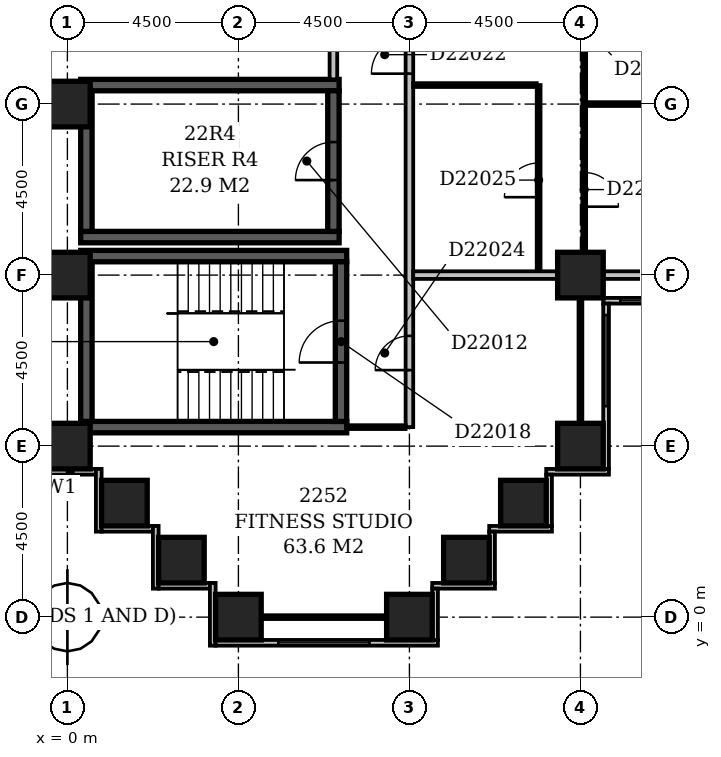
"""IFC4 building model, lengths in metres.
Left out: names, types, materials, properties, quantities, classifications, styles, units other than length and angle.
Written with IfcOpenShell. Run it as: python <this file> out.ifc"""

import sys

from ifc_helpers import new_model, si_unit, direction, frame, frame_2d, origin, origin_2d, place, context, subcontext, project, spatial, rectangle, extrude, element, fill, save


model = new_model("IFC4")
c1 = context("Model", 3, precision=1e-05, world=origin(), true_north=direction((0.0, 1.0)))
c2 = subcontext(c1, "Body", "Model", "MODEL_VIEW")
j1 = project(units=[si_unit("LENGTHUNIT", "METRE"), si_unit("PLANEANGLEUNIT", "RADIAN")], contexts=[c1])
p1 = place(None, origin())
s1 = spatial("IfcSite", under=j1, at=p1, CompositionType="ELEMENT")
p2 = place(p1, origin())
s2 = spatial("IfcBuilding", under=s1, at=p2, CompositionType="ELEMENT")
p3 = place(p2, frame((0.0, 0.0, 90.2)))
s3 = spatial("IfcBuildingStorey", under=s2, at=p3, CompositionType="ELEMENT", Elevation=90.2)
for number, where, z_axis, x_axis in (
    (1, (0.35, 5.0, -0.3), (0.0, 0.0, 1.0), (1.0, 0.0, 0.0)),
    (2, (0.35, 9.5, -0.3), (0.0, 0.0, 1.0), (1.0, 0.0, 0.0)),
):
    element("IfcWall", number, at=place(p3, frame(where, z_axis=z_axis, x_axis=x_axis)), inside=s3, PredefinedType="SHEAR", context=c2, shape_type="SweptSolid", body=[
        extrude(rectangle(XDim=7.0, YDim=0.3, at=frame_2d((3.5, 0.0))), origin(), (0.0, 0.0, 1.0), 3.6),
    ])
for number, where, z_axis, x_axis in (
    (3, (0.35, 10.0, -0.3), (0.0, 0.0, 1.0), (1.0, 0.0, 0.0)),
    (4, (0.35, 14.0, -0.3), (0.0, 0.0, 1.0), (1.0, 0.0, 0.0)),
):
    element("IfcWall", number, at=place(p3, frame(where, z_axis=z_axis, x_axis=x_axis)), inside=s3, PredefinedType="SHEAR", context=c2, shape_type="SweptSolid", body=[
        extrude(rectangle(XDim=6.8, YDim=0.3, at=frame_2d((3.4, 0.0))), origin(), (0.0, 0.0, 1.0), 3.6),
    ])
p4 = place(p3, frame((0.5, 5.15, -0.3), z_axis=(0.0, 0.0, 1.0), x_axis=(0.0, 1.0, 0.0)))
e5 = element("IfcWall", 5, at=p4, inside=s3, PredefinedType="SHEAR", context=c2, shape_type="SweptSolid", body=[
    extrude(rectangle(XDim=4.2, YDim=0.3, at=frame_2d((2.1, 0.0))), origin(), (0.0, 0.0, 1.0), 3.6),
])
p5 = place(p3, frame((0.5, 10.15, -0.3), z_axis=(0.0, 0.0, 1.0), x_axis=(0.0, 1.0, 0.0)))
e6 = element("IfcWall", 6, at=p5, inside=s3, PredefinedType="SHEAR", context=c2, shape_type="SweptSolid", body=[
    extrude(rectangle(XDim=3.7, YDim=0.3, at=frame_2d((1.85, 0.0))), origin(), (0.0, 0.0, 1.0), 3.6),
])
p6 = place(p3, frame((7.0, 10.15, -0.3), z_axis=(0.0, 0.0, 1.0), x_axis=(0.0, 1.0, 0.0)))
e7 = element("IfcWall", 7, at=p6, inside=s3, PredefinedType="SHEAR", context=c2, shape_type="SweptSolid", body=[
    extrude(rectangle(XDim=3.7, YDim=0.3, at=frame_2d((1.85, 0.0))), origin(), (0.0, 0.0, 1.0), 3.6),
])
p7 = place(p6, frame((1.35, 0.0, 0.3)))
e8 = element("IfcOpeningElement", 8, at=p7, cuts=e7, PredefinedType="OPENING", context=c2, shape_type="SweptSolid", body=[
    extrude(rectangle(XDim=1.0, YDim=2.1, at=frame_2d((0.5, 1.05))), frame((0.0, 0.162, 0.0), z_axis=(0.0, -1.0, 0.0), x_axis=(1.0, 0.0, 0.0)), (0.0, 0.0, 1.0), 0.324),
])
p8 = place(p3, frame((7.2, 5.15, -0.3), z_axis=(0.0, 0.0, 1.0), x_axis=(0.0, 1.0, 0.0)))
e9 = element("IfcWall", 9, at=p8, inside=s3, PredefinedType="SHEAR", context=c2, shape_type="SweptSolid", body=[
    extrude(rectangle(XDim=4.2, YDim=0.3, at=frame_2d((2.1, 0.0))), origin(), (0.0, 0.0, 1.0), 3.6),
])
p9 = place(p8, frame((1.55, 0.0, 0.3)))
e10 = element("IfcOpeningElement", 10, at=p9, cuts=e9, PredefinedType="OPENING", context=c2, shape_type="SweptSolid", body=[
    extrude(rectangle(XDim=1.1, YDim=2.1, at=frame_2d((0.55, 1.05))), frame((0.0, 0.162, 0.0), z_axis=(0.0, -1.0, 0.0), x_axis=(1.0, 0.0, 0.0)), (0.0, 0.0, 1.0), 0.324),
])
for number, where, z_axis, x_axis in (
    (11, (4.5, 0.0, -0.3), (0.0, 0.0, 1.0), (1.0, 0.0, 0.0)),
    (12, (9.0, 0.0, -0.3), (0.0, 0.0, 1.0), (1.0, 0.0, 0.0)),
    (13, (3.0, 1.5, -0.3), (0.0, 0.0, 1.0), (1.0, 0.0, 0.0)),
    (14, (10.5, 1.5, -0.3), (0.0, 0.0, 1.0), (1.0, 0.0, 0.0)),
    (15, (1.5, 3.0, -0.3), (0.0, 0.0, 1.0), (1.0, 0.0, 0.0)),
    (16, (12.0, 3.0, -0.3), (0.0, 0.0, 1.0), (1.0, 0.0, 0.0)),
    (17, (0.0, 4.5, -0.3), (0.0, 0.0, 1.0), (1.0, 0.0, 0.0)),
    (18, (13.5, 4.5, -0.3), (0.0, 0.0, 1.0), (1.0, 0.0, 0.0)),
    (19, (0.0, 9.0, -0.3), (0.0, 0.0, 1.0), (1.0, 0.0, 0.0)),
    (20, (13.5, 9.0, -0.3), (0.0, 0.0, 1.0), (1.0, 0.0, 0.0)),
    (21, (0.0, 13.5, -0.3), (0.0, 0.0, 1.0), (1.0, 0.0, 0.0)),
):
    element("IfcColumn", number, at=place(p3, frame(where, z_axis=z_axis, x_axis=x_axis)), inside=s3, PredefinedType="COLUMN", context=c2, shape_type="SweptSolid", body=[
        extrude(rectangle(XDim=1.2, YDim=1.2, at=origin_2d()), origin(), (0.0, 0.0, 1.0), 3.6),
    ])
p10 = place(p3, frame((9.675, -0.6, 0.0), z_axis=(0.0, 0.0, 1.0), x_axis=(0.0, 1.0, 0.0)))
e22 = element("IfcWall", 22, at=p10, inside=s3, PredefinedType="STANDARD", context=c2, shape_type="SweptSolid", body=[
    extrude(rectangle(XDim=1.35, YDim=0.15, at=frame_2d((0.675, 0.0))), origin(), (0.0, 0.0, 1.0), 2.7),
])
p11 = place(p3, frame((9.6, 0.825, 0.0), z_axis=(0.0, 0.0, 1.0), x_axis=(1.0, 0.0, 0.0)))
e23 = element("IfcWall", 23, at=p11, inside=s3, PredefinedType="STANDARD", context=c2, shape_type="SweptSolid", body=[
    extrude(rectangle(XDim=1.65, YDim=0.15, at=frame_2d((0.825, 0.0))), origin(), (0.0, 0.0, 1.0), 2.7),
])
p12 = place(p3, frame((11.175, 0.9, 0.0), z_axis=(0.0, 0.0, 1.0), x_axis=(0.0, 1.0, 0.0)))
e24 = element("IfcWall", 24, at=p12, inside=s3, PredefinedType="STANDARD", context=c2, shape_type="SweptSolid", body=[
    extrude(rectangle(XDim=1.35, YDim=0.15, at=frame_2d((0.675, 0.0))), origin(), (0.0, 0.0, 1.0), 2.7),
])
p13 = place(p3, frame((11.1, 2.325, 0.0), z_axis=(0.0, 0.0, 1.0), x_axis=(1.0, 0.0, 0.0)))
e25 = element("IfcWall", 25, at=p13, inside=s3, PredefinedType="STANDARD", context=c2, shape_type="SweptSolid", body=[
    extrude(rectangle(XDim=1.65, YDim=0.15, at=frame_2d((0.825, 0.0))), origin(), (0.0, 0.0, 1.0), 2.7),
])
p14 = place(p3, frame((12.675, 2.4, 0.0), z_axis=(0.0, 0.0, 1.0), x_axis=(0.0, 1.0, 0.0)))
e26 = element("IfcWall", 26, at=p14, inside=s3, PredefinedType="STANDARD", context=c2, shape_type="SweptSolid", body=[
    extrude(rectangle(XDim=1.35, YDim=0.15, at=frame_2d((0.675, 0.0))), origin(), (0.0, 0.0, 1.0), 2.7),
])
p15 = place(p3, frame((12.6, 3.825, 0.0), z_axis=(0.0, 0.0, 1.0), x_axis=(1.0, 0.0, 0.0)))
e27 = element("IfcWall", 27, at=p15, inside=s3, PredefinedType="STANDARD", context=c2, shape_type="SweptSolid", body=[
    extrude(rectangle(XDim=1.65, YDim=0.15, at=frame_2d((0.825, 0.0))), origin(), (0.0, 0.0, 1.0), 2.7),
])
p16 = place(p3, frame((14.175, 3.9, 0.0), z_axis=(0.0, 0.0, 1.0), x_axis=(0.0, 1.0, 0.0)))
e28 = element("IfcWall", 28, at=p16, inside=s3, PredefinedType="STANDARD", context=c2, shape_type="SweptSolid", body=[
    extrude(rectangle(XDim=4.35, YDim=0.15, at=frame_2d((2.175, 0.0))), origin(), (0.0, 0.0, 1.0), 2.7),
])
p17 = place(p16, frame((1.65, 0.0, 0.6)))
e29 = element("IfcOpeningElement", 29, at=p17, cuts=e28, PredefinedType="OPENING", context=c2, shape_type="SweptSolid", body=[
    extrude(rectangle(XDim=2.4, YDim=1.8, at=frame_2d((1.2, 0.9))), frame((0.0, 0.087, 0.0), z_axis=(0.0, -1.0, 0.0), x_axis=(1.0, 0.0, 0.0)), (0.0, 0.0, 1.0), 0.174),
])
p18 = place(p3, frame((14.1, 8.325, 0.0), z_axis=(0.0, 0.0, 1.0), x_axis=(1.0, 0.0, 0.0)))
e30 = element("IfcWall", 30, at=p18, inside=s3, PredefinedType="STANDARD", context=c2, shape_type="SweptSolid", body=[
    extrude(rectangle(XDim=4.65, YDim=0.15, at=frame_2d((2.325, 0.0))), origin(), (0.0, 0.0, 1.0), 2.7),
])
p19 = place(p18, frame((0.45, 0.0, 0.6)))
e31 = element("IfcOpeningElement", 31, at=p19, cuts=e30, PredefinedType="OPENING", context=c2, shape_type="SweptSolid", body=[
    extrude(rectangle(XDim=2.4, YDim=1.8, at=frame_2d((1.2, 0.9))), frame((0.0, 0.087, 0.0), z_axis=(0.0, -1.0, 0.0), x_axis=(1.0, 0.0, 0.0)), (0.0, 0.0, 1.0), 0.174),
])
p20 = place(p3, frame((-0.6, 3.825, 0.0), z_axis=(0.0, 0.0, 1.0), x_axis=(1.0, 0.0, 0.0)))
e32 = element("IfcWall", 32, at=p20, inside=s3, PredefinedType="STANDARD", context=c2, shape_type="SweptSolid", body=[
    extrude(rectangle(XDim=1.35, YDim=0.15, at=frame_2d((0.675, 0.0))), origin(), (0.0, 0.0, 1.0), 2.7),
])
p21 = place(p3, frame((0.825, 3.9, 0.0), z_axis=(0.0, 0.0, 1.0), x_axis=(0.0, -1.0, 0.0)))
e33 = element("IfcWall", 33, at=p21, inside=s3, PredefinedType="STANDARD", context=c2, shape_type="SweptSolid", body=[
    extrude(rectangle(XDim=1.65, YDim=0.15, at=frame_2d((0.825, 0.0))), origin(), (0.0, 0.0, 1.0), 2.7),
])
p22 = place(p3, frame((0.9, 2.325, 0.0), z_axis=(0.0, 0.0, 1.0), x_axis=(1.0, 0.0, 0.0)))
e34 = element("IfcWall", 34, at=p22, inside=s3, PredefinedType="STANDARD", context=c2, shape_type="SweptSolid", body=[
    extrude(rectangle(XDim=1.35, YDim=0.15, at=frame_2d((0.675, 0.0))), origin(), (0.0, 0.0, 1.0), 2.7),
])
p23 = place(p3, frame((2.325, 2.4, 0.0), z_axis=(0.0, 0.0, 1.0), x_axis=(0.0, -1.0, 0.0)))
e35 = element("IfcWall", 35, at=p23, inside=s3, PredefinedType="STANDARD", context=c2, shape_type="SweptSolid", body=[
    extrude(rectangle(XDim=1.65, YDim=0.15, at=frame_2d((0.825, 0.0))), origin(), (0.0, 0.0, 1.0), 2.7),
])
p24 = place(p3, frame((2.4, 0.825, 0.0), z_axis=(0.0, 0.0, 1.0), x_axis=(1.0, 0.0, 0.0)))
e36 = element("IfcWall", 36, at=p24, inside=s3, PredefinedType="STANDARD", context=c2, shape_type="SweptSolid", body=[
    extrude(rectangle(XDim=1.35, YDim=0.15, at=frame_2d((0.675, 0.0))), origin(), (0.0, 0.0, 1.0), 2.7),
])
p25 = place(p3, frame((3.825, 0.9, 0.0), z_axis=(0.0, 0.0, 1.0), x_axis=(0.0, -1.0, 0.0)))
e37 = element("IfcWall", 37, at=p25, inside=s3, PredefinedType="STANDARD", context=c2, shape_type="SweptSolid", body=[
    extrude(rectangle(XDim=1.65, YDim=0.15, at=frame_2d((0.825, 0.0))), origin(), (0.0, 0.0, 1.0), 2.7),
])
p26 = place(p3, frame((3.9, -0.675, 0.0), z_axis=(0.0, 0.0, 1.0), x_axis=(1.0, 0.0, 0.0)))
e38 = element("IfcWall", 38, at=p26, inside=s3, PredefinedType="STANDARD", context=c2, shape_type="SweptSolid", body=[
    extrude(rectangle(XDim=5.85, YDim=0.15, at=frame_2d((2.925, 0.0))), origin(), (0.0, 0.0, 1.0), 2.7),
])
p27 = place(p26, frame((1.65, 0.0, 0.6)))
e39 = element("IfcOpeningElement", 39, at=p27, cuts=e38, PredefinedType="OPENING", context=c2, shape_type="SweptSolid", body=[
    extrude(rectangle(XDim=2.4, YDim=1.8, at=frame_2d((1.2, 0.9))), frame((0.0, 0.087, 0.0), z_axis=(0.0, -1.0, 0.0), x_axis=(1.0, 0.0, 0.0)), (0.0, 0.0, 1.0), 0.174),
])
p28 = place(p3, frame((5.1, 0.0, 0.0), z_axis=(0.0, 0.0, 1.0), x_axis=(1.0, 0.0, 0.0)))
e40 = element("IfcWall", 40, at=p28, inside=s3, PredefinedType="PARTITIONING", context=c2, shape_type="SweptSolid", body=[
    extrude(rectangle(XDim=3.3, YDim=0.1, at=frame_2d((1.65, 0.0))), origin(), (0.0, 0.0, 1.0), 2.7),
])
p29 = place(p3, frame((0.0, 4.4, 0.0), z_axis=(0.0, 0.0, 1.0), x_axis=(0.0, 1.0, 0.0)))
e41 = element("IfcWall", 41, at=p29, inside=s3, PredefinedType="PARTITIONING", context=c2, shape_type="SweptSolid", body=[
    extrude(rectangle(XDim=0.7, YDim=0.1, at=frame_2d((0.35, 0.0))), origin(), (0.0, 0.0, 1.0), 2.7),
])
p30 = place(p3, frame((7.349, 5.0, 0.0), z_axis=(0.0, 0.0, 1.0), x_axis=(1.0, 0.0, 0.0)))
e42 = element("IfcWall", 42, at=p30, inside=s3, PredefinedType="PARTITIONING", context=c2, shape_type="SweptSolid", body=[
    extrude(rectangle(XDim=1.551, YDim=0.1, at=frame_2d((0.775, 0.0))), origin(), (0.0, 0.0, 1.0), 3.3),
])
p31 = place(p3, frame((9.0, 5.0, 0.0), z_axis=(0.0, 0.0, 1.0), x_axis=(0.0, 1.0, 0.0)))
e43 = element("IfcWall", 43, at=p31, inside=s3, PredefinedType="PARTITIONING", context=c2, shape_type="SweptSolid", body=[
    extrude(rectangle(XDim=44.5, YDim=0.2, at=frame_2d((22.25, 0.0))), origin(), (0.0, 0.0, 1.0), 3.3),
])
p32 = place(p31, frame((28.45, 0.0, 0.0)))
e44 = element("IfcOpeningElement", 44, at=p32, cuts=e43, PredefinedType="OPENING", context=c2, shape_type="SweptSolid", body=[
    extrude(rectangle(XDim=1.0, YDim=2.1, at=frame_2d((0.5, 1.05))), frame((0.0, 0.112, 0.0), z_axis=(0.0, -1.0, 0.0), x_axis=(1.0, 0.0, 0.0)), (0.0, 0.0, 1.0), 0.224),
])
p33 = place(p31, frame((22.8, 0.0, 0.0)))
e45 = element("IfcOpeningElement", 45, at=p33, cuts=e43, PredefinedType="OPENING", context=c2, shape_type="SweptSolid", body=[
    extrude(rectangle(XDim=1.0, YDim=2.1, at=frame_2d((0.5, 1.05))), frame((0.0, 0.112, 0.0), z_axis=(0.0, -1.0, 0.0), x_axis=(1.0, 0.0, 0.0)), (0.0, 0.0, 1.0), 0.224),
])
p34 = place(p31, frame((14.55, 0.0, 0.0)))
e46 = element("IfcOpeningElement", 46, at=p34, cuts=e43, PredefinedType="OPENING", context=c2, shape_type="SweptSolid", body=[
    extrude(rectangle(XDim=1.0, YDim=2.1, at=frame_2d((0.5, 1.05))), frame((0.0, 0.112, 0.0), z_axis=(0.0, -1.0, 0.0), x_axis=(1.0, 0.0, 0.0)), (0.0, 0.0, 1.0), 0.224),
])
p35 = place(p31, frame((9.3, 0.0, 0.0)))
e47 = element("IfcOpeningElement", 47, at=p35, cuts=e43, PredefinedType="OPENING", context=c2, shape_type="SweptSolid", body=[
    extrude(rectangle(XDim=1.0, YDim=2.1, at=frame_2d((0.5, 1.05))), frame((0.0, 0.112, 0.0), z_axis=(0.0, -1.0, 0.0), x_axis=(1.0, 0.0, 0.0)), (0.0, 0.0, 1.0), 0.224),
])
p36 = place(p31, frame((35.0, 0.0, 0.0)))
e48 = element("IfcOpeningElement", 48, at=p36, cuts=e43, PredefinedType="OPENING", context=c2, shape_type="SweptSolid", body=[
    extrude(rectangle(XDim=0.9, YDim=2.1, at=frame_2d((0.45, 1.05))), frame((0.0, 0.112, 0.0), z_axis=(0.0, -1.0, 0.0), x_axis=(1.0, 0.0, 0.0)), (0.0, 0.0, 1.0), 0.224),
])
p37 = place(p31, frame((1.5, 0.0, 0.0)))
e49 = element("IfcOpeningElement", 49, at=p37, cuts=e43, PredefinedType="OPENING", context=c2, shape_type="SweptSolid", body=[
    extrude(rectangle(XDim=0.9, YDim=2.1, at=frame_2d((0.45, 1.05))), frame((0.0, 0.112, 0.0), z_axis=(0.0, -1.0, 0.0), x_axis=(1.0, 0.0, 0.0)), (0.0, 0.0, 1.0), 0.224),
])
p38 = place(p3, frame((13.5, 5.1, 0.0), z_axis=(0.0, 0.0, 1.0), x_axis=(0.0, 1.0, 0.0)))
e50 = element("IfcWall", 50, at=p38, inside=s3, PredefinedType="PARTITIONING", context=c2, shape_type="SweptSolid", body=[
    extrude(rectangle(XDim=3.3, YDim=0.1, at=frame_2d((1.65, 0.0))), origin(), (0.0, 0.0, 1.0), 2.7),
])
p39 = place(p3, frame((9.1, 9.0, 0.0), z_axis=(0.0, 0.0, 1.0), x_axis=(1.0, 0.0, 0.0)))
e51 = element("IfcWall", 51, at=p39, inside=s3, PredefinedType="PARTITIONING", context=c2, shape_type="SweptSolid", body=[
    extrude(rectangle(XDim=3.8, YDim=0.2, at=frame_2d((1.9, 0.0))), origin(), (0.0, 0.0, 1.0), 3.3),
])
p40 = place(p3, frame((14.1, 9.0, 0.0), z_axis=(0.0, 0.0, 1.0), x_axis=(1.0, 0.0, 0.0)))
e52 = element("IfcWall", 52, at=p40, inside=s3, PredefinedType="PARTITIONING", context=c2, shape_type="SweptSolid", body=[
    extrude(rectangle(XDim=3.3, YDim=0.2, at=frame_2d((1.65, 0.0))), origin(), (0.0, 0.0, 1.0), 2.7),
])
p41 = place(p3, frame((12.4, 9.1, 0.0), z_axis=(0.0, 0.0, 1.0), x_axis=(0.0, 1.0, 0.0)))
e53 = element("IfcWall", 53, at=p41, inside=s3, PredefinedType="PARTITIONING", context=c2, shape_type="SweptSolid", body=[
    extrude(rectangle(XDim=4.9, YDim=0.1, at=frame_2d((2.45, 0.0))), origin(), (0.0, 0.0, 1.0), 3.3),
])
p42 = place(p41, frame((1.95, 0.0, 0.0)))
e54 = element("IfcOpeningElement", 54, at=p42, cuts=e53, PredefinedType="OPENING", context=c2, shape_type="SweptSolid", body=[
    extrude(rectangle(XDim=0.9, YDim=2.1, at=frame_2d((0.45, 1.05))), frame((0.0, 0.062, 0.0), z_axis=(0.0, -1.0, 0.0), x_axis=(1.0, 0.0, 0.0)), (0.0, 0.0, 1.0), 0.124),
])
p43 = place(p3, frame((13.6, 9.6, 0.0), z_axis=(0.0, 0.0, 1.0), x_axis=(0.0, 1.0, 0.0)))
e55 = element("IfcWall", 55, at=p43, inside=s3, PredefinedType="PARTITIONING", context=c2, shape_type="SweptSolid", body=[
    extrude(rectangle(XDim=8.3, YDim=0.1, at=frame_2d((4.15, 0.0))), origin(), (0.0, 0.0, 1.0), 3.3),
])
p44 = place(p43, frame((1.2, 0.0, 0.0)))
e56 = element("IfcOpeningElement", 56, at=p44, cuts=e55, PredefinedType="OPENING", context=c2, shape_type="SweptSolid", body=[
    extrude(rectangle(XDim=0.9, YDim=2.1, at=frame_2d((0.45, 1.05))), frame((0.0, 0.062, 0.0), z_axis=(0.0, -1.0, 0.0), x_axis=(1.0, 0.0, 0.0)), (0.0, 0.0, 1.0), 0.124),
])
p45 = place(p43, frame((5.7, 0.0, 0.0)))
e57 = element("IfcOpeningElement", 57, at=p45, cuts=e55, PredefinedType="OPENING", context=c2, shape_type="SweptSolid", body=[
    extrude(rectangle(XDim=0.9, YDim=2.1, at=frame_2d((0.45, 1.05))), frame((0.0, 0.062, 0.0), z_axis=(0.0, -1.0, 0.0), x_axis=(1.0, 0.0, 0.0)), (0.0, 0.0, 1.0), 0.124),
])
p46 = place(p3, frame((13.65, 13.5, 0.0), z_axis=(0.0, 0.0, 1.0), x_axis=(1.0, 0.0, 0.0)))
e58 = element("IfcWall", 58, at=p46, inside=s3, PredefinedType="PARTITIONING", context=c2, shape_type="SweptSolid", body=[
    extrude(rectangle(XDim=3.75, YDim=0.1, at=frame_2d((1.875, 0.0))), origin(), (0.0, 0.0, 1.0), 3.3),
])
p47 = place(p3, frame((9.1, 14.0, 0.0), z_axis=(0.0, 0.0, 1.0), x_axis=(1.0, 0.0, 0.0)))
e59 = element("IfcWall", 59, at=p47, inside=s3, PredefinedType="PARTITIONING", context=c2, shape_type="SweptSolid", body=[
    extrude(rectangle(XDim=3.25, YDim=0.1, at=frame_2d((1.625, 0.0))), origin(), (0.0, 0.0, 1.0), 3.3),
])
p48 = place(p3, frame((7.0, 14.15, 0.0), z_axis=(0.0, 0.0, 1.0), x_axis=(0.0, 1.0, 0.0)))
e60 = element("IfcWall", 60, at=p48, inside=s3, PredefinedType="PARTITIONING", context=c2, shape_type="SweptSolid", body=[
    extrude(rectangle(XDim=4.2, YDim=0.2, at=frame_2d((2.1, 0.0))), origin(), (0.0, 0.0, 1.0), 3.3),
])
p49 = place(p48, frame((1.6, 0.0, 0.0)))
e61 = element("IfcOpeningElement", 61, at=p49, cuts=e60, PredefinedType="OPENING", context=c2, shape_type="SweptSolid", body=[
    extrude(rectangle(XDim=1.0, YDim=2.1, at=frame_2d((0.5, 1.05))), frame((0.0, 0.112, 0.0), z_axis=(0.0, -1.0, 0.0), x_axis=(1.0, 0.0, 0.0)), (0.0, 0.0, 1.0), 0.224),
])
p50 = place(p17, origin())
e62 = element("IfcWindow", 62, at=p50, inside=s3, PartitioningType="SINGLE_PANEL", PredefinedType="WINDOW", context=c2, shape_type="SweptSolid", body=[
    extrude(rectangle(XDim=2.4, YDim=1.8, at=frame_2d((1.2, 0.9))), frame((0.0, 0.03, 0.0), z_axis=(0.0, -1.0, 0.0), x_axis=(1.0, 0.0, 0.0)), (0.0, 0.0, 1.0), 0.06),
])
fill(e29, e62)
p51 = place(p19, origin())
e63 = element("IfcWindow", 63, at=p51, inside=s3, PartitioningType="SINGLE_PANEL", PredefinedType="WINDOW", context=c2, shape_type="SweptSolid", body=[
    extrude(rectangle(XDim=2.4, YDim=1.8, at=frame_2d((1.2, 0.9))), frame((0.0, 0.03, 0.0), z_axis=(0.0, -1.0, 0.0), x_axis=(1.0, 0.0, 0.0)), (0.0, 0.0, 1.0), 0.06),
])
fill(e31, e63)
p52 = place(p27, origin())
e64 = element("IfcWindow", 64, at=p52, inside=s3, PartitioningType="SINGLE_PANEL", PredefinedType="WINDOW", context=c2, shape_type="SweptSolid", body=[
    extrude(rectangle(XDim=2.4, YDim=1.8, at=frame_2d((1.2, 0.9))), frame((0.0, 0.03, 0.0), z_axis=(0.0, -1.0, 0.0), x_axis=(1.0, 0.0, 0.0)), (0.0, 0.0, 1.0), 0.06),
])
fill(e39, e64)
p53 = place(p7, origin())
e65 = element("IfcDoor", 65, at=p53, inside=s3, OperationType="SINGLE_SWING_LEFT", PredefinedType="DOOR", context=c2, shape_type="SweptSolid", body=[
    extrude(rectangle(XDim=1.0, YDim=2.1, at=frame_2d((0.5, 1.05))), frame((0.0, 0.025, 0.0), z_axis=(0.0, -1.0, 0.0), x_axis=(1.0, 0.0, 0.0)), (0.0, 0.0, 1.0), 0.05),
])
fill(e8, e65)
p54 = place(p9, origin())
e66 = element("IfcDoor", 66, at=p54, inside=s3, OperationType="SINGLE_SWING_LEFT", PredefinedType="DOOR", context=c2, shape_type="SweptSolid", body=[
    extrude(rectangle(XDim=1.1, YDim=2.1, at=frame_2d((0.55, 1.05))), frame((0.0, 0.025, 0.0), z_axis=(0.0, -1.0, 0.0), x_axis=(1.0, 0.0, 0.0)), (0.0, 0.0, 1.0), 0.05),
])
fill(e10, e66)
p55 = place(p35, origin())
e67 = element("IfcDoor", 67, at=p55, inside=s3, OperationType="SINGLE_SWING_LEFT", PredefinedType="DOOR", context=c2, shape_type="SweptSolid", body=[
    extrude(rectangle(XDim=1.0, YDim=2.1, at=frame_2d((0.5, 1.05))), frame((0.0, 0.025, 0.0), z_axis=(0.0, -1.0, 0.0), x_axis=(1.0, 0.0, 0.0)), (0.0, 0.0, 1.0), 0.05),
])
fill(e47, e67)
p56 = place(p37, origin())
e68 = element("IfcDoor", 68, at=p56, inside=s3, OperationType="SINGLE_SWING_LEFT", PredefinedType="DOOR", context=c2, shape_type="SweptSolid", body=[
    extrude(rectangle(XDim=0.9, YDim=2.1, at=frame_2d((0.45, 1.05))), frame((0.0, 0.025, 0.0), z_axis=(0.0, -1.0, 0.0), x_axis=(1.0, 0.0, 0.0)), (0.0, 0.0, 1.0), 0.05),
])
fill(e49, e68)
p57 = place(p42, origin())
e69 = element("IfcDoor", 69, at=p57, inside=s3, OperationType="SINGLE_SWING_LEFT", PredefinedType="DOOR", context=c2, shape_type="SweptSolid", body=[
    extrude(rectangle(XDim=0.9, YDim=2.1, at=frame_2d((0.45, 1.05))), frame((0.0, 0.025, 0.0), z_axis=(0.0, -1.0, 0.0), x_axis=(1.0, 0.0, 0.0)), (0.0, 0.0, 1.0), 0.05),
])
fill(e54, e69)
p58 = place(p44, frame((0.9, 0.0, 0.0), z_axis=(0.0, 0.0, 1.0), x_axis=(-1.0, 0.0, 0.0)))
e70 = element("IfcDoor", 70, at=p58, inside=s3, OperationType="SINGLE_SWING_RIGHT", PredefinedType="DOOR", context=c2, shape_type="SweptSolid", body=[
    extrude(rectangle(XDim=0.9, YDim=2.1, at=frame_2d((0.45, 1.05))), frame((0.0, 0.025, 0.0), z_axis=(0.0, -1.0, 0.0), x_axis=(1.0, 0.0, 0.0)), (0.0, 0.0, 1.0), 0.05),
])
fill(e56, e70)
save(model, sys.argv[1])
